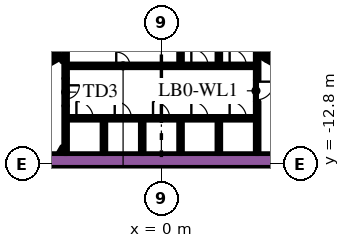
"""IFC4 building model, lengths in metres.
Left out: names, types, materials, properties, quantities, classifications, styles, units other than length and angle.
Written with IfcOpenShell. Run it as: python <this file> out.ifc"""

import sys

from ifc_helpers import new_model, si_unit, direction, frame, frame_2d, origin, place, context, subcontext, project, spatial, rectangle, extrude, element, fill, save


model = new_model("IFC4")
c1 = context("Model", 3, precision=1e-05, world=origin(), true_north=direction((0.0, 1.0)))
c2 = subcontext(c1, "Body", "Model", "MODEL_VIEW")
j1 = project(units=[si_unit("LENGTHUNIT", "METRE"), si_unit("PLANEANGLEUNIT", "RADIAN")], contexts=[c1])
p1 = place(None, origin())
s1 = spatial("IfcSite", under=j1, at=p1, CompositionType="ELEMENT")
p2 = place(p1, origin())
s2 = spatial("IfcBuilding", under=s1, at=p2, CompositionType="ELEMENT")
p3 = place(p2, frame((0.0, 0.0, 21.6)))
s3 = spatial("IfcBuildingStorey", under=s2, at=p3, CompositionType="ELEMENT", Elevation=21.6)
p4 = place(p3, frame((-12.019, -12.55, 0.0), z_axis=(0.0, 0.0, 1.0), x_axis=(1.0, 0.0, 0.0)))
e1 = element("IfcWall", 1, at=p4, inside=s3, PredefinedType="SOLIDWALL", context=c2, shape_type="SweptSolid", body=[
    extrude(rectangle(XDim=21.63, YDim=0.9, at=frame_2d((10.815, 0.0))), origin(), (0.0, 0.0, 1.0), 6.0),
])
p5 = place(p3, frame((12.84, -9.261, 0.0), z_axis=(0.0, 0.0, 1.0), x_axis=(-0.866013990052, 0.500019768644, 0.0)))
e2 = element("IfcWall", 2, at=p5, inside=s3, PredefinedType="SOLIDWALL", context=c2, shape_type="SweptSolid", body=[
    extrude(rectangle(XDim=6.8, YDim=0.25, at=frame_2d((3.4, 0.0))), origin(), (0.0, 0.0, 1.0), 6.0),
])
p6 = place(p3, frame((6.78, -5.906, 0.0), z_axis=(0.0, 0.0, 1.0), x_axis=(0.500223362819, 0.865896406789, 0.0)))
e3 = element("IfcWall", 3, at=p6, inside=s3, PredefinedType="SOLIDWALL", context=c2, shape_type="SweptSolid", body=[
    extrude(rectangle(XDim=0.675, YDim=0.25, at=frame_2d((0.337, 0.0))), origin(), (0.0, 0.0, 1.0), 6.0),
])
p7 = place(p3, frame((-12.84, -9.261, 0.0), z_axis=(0.0, 0.0, 1.0), x_axis=(0.866016039709, 0.500016218704, 0.0)))
e4 = element("IfcWall", 4, at=p7, inside=s3, PredefinedType="SOLIDWALL", context=c2, shape_type="SweptSolid", body=[
    extrude(rectangle(XDim=7.05, YDim=0.25, at=frame_2d((3.525, 0.0))), origin(), (0.0, 0.0, 1.0), 6.0),
])
p8 = place(p3, frame((-6.905, -5.69, 0.0), z_axis=(0.0, 0.0, 1.0), x_axis=(-0.500402024738, 0.865793170242, 0.0)))
e5 = element("IfcWall", 5, at=p8, inside=s3, PredefinedType="SOLIDWALL", context=c2, shape_type="SweptSolid", body=[
    extrude(rectangle(XDim=0.425, YDim=0.25, at=frame_2d((0.212, 0.0))), origin(), (0.0, 0.0, 1.0), 6.0),
])
p9 = place(p3, frame((-3.78, -12.1, 0.0), z_axis=(0.0, 0.0, 1.0), x_axis=(0.0, 1.0, 0.0)))
e6 = element("IfcWall", 6, at=p9, inside=s3, PredefinedType="SOLIDWALL", context=c2, shape_type="SweptSolid", body=[
    extrude(rectangle(XDim=2.2, YDim=0.25, at=frame_2d((1.1, 0.0))), origin(), (0.0, 0.0, 1.0), 6.0),
])
p10 = place(p3, frame((-6.3, -12.1, 0.0), z_axis=(0.0, 0.0, 1.0), x_axis=(0.0, 1.0, 0.0)))
e7 = element("IfcWall", 7, at=p10, inside=s3, PredefinedType="SOLIDWALL", context=c2, shape_type="SweptSolid", body=[
    extrude(rectangle(XDim=3.146, YDim=0.25, at=frame_2d((1.573, 0.0))), origin(), (0.0, 0.0, 1.0), 6.0),
])
p11 = place(p3, frame((6.3, -8.67, 0.0), z_axis=(0.0, 0.0, 1.0), x_axis=(0.0, -1.0, 0.0)))
e8 = element("IfcWall", 8, at=p11, inside=s3, PredefinedType="SOLIDWALL", context=c2, shape_type="SweptSolid", body=[
    extrude(rectangle(XDim=3.43, YDim=0.25, at=frame_2d((1.715, 0.0))), origin(), (0.0, 0.0, 1.0), 6.0),
])
p12 = place(p3, frame((6.3, -7.268, 0.0), z_axis=(0.0, 0.0, 1.0), x_axis=(0.0, 1.0, 0.0)))
e9 = element("IfcWall", 9, at=p12, inside=s3, PredefinedType="SOLIDWALL", context=c2, shape_type="SweptSolid", body=[
    extrude(rectangle(XDim=3.268, YDim=0.25, at=frame_2d((1.634, 0.0))), origin(), (0.0, 0.0, 1.0), 6.0),
])
for number, where, z_axis, x_axis in (
    (10, (3.78, -4.0, 0.0), (0.0, 0.0, 1.0), (0.0, -1.0, 0.0)),
    (11, (1.26, -4.0, 0.0), (0.0, 0.0, 1.0), (0.0, -1.0, 0.0)),
):
    element("IfcWall", number, at=place(p3, frame(where, z_axis=z_axis, x_axis=x_axis)), inside=s3, PredefinedType="SOLIDWALL", context=c2, shape_type="SweptSolid", body=[
        extrude(rectangle(XDim=2.2, YDim=0.25, at=frame_2d((1.1, 0.0))), origin(), (0.0, 0.0, 1.0), 6.0),
    ])
p13 = place(p3, frame((-6.3, -4.0, 0.0), z_axis=(0.0, 0.0, 1.0), x_axis=(0.0, -1.0, 0.0)))
e12 = element("IfcWall", 12, at=p13, inside=s3, PredefinedType="SOLIDWALL", context=c2, shape_type="SweptSolid", body=[
    extrude(rectangle(XDim=3.154, YDim=0.25, at=frame_2d((1.577, 0.0))), origin(), (0.0, 0.0, 1.0), 6.0),
])
for number, where, z_axis, x_axis in (
    (13, (3.78, -12.1, 0.0), (0.0, 0.0, 1.0), (0.0, 1.0, 0.0)),
    (14, (1.26, -12.1, 0.0), (0.0, 0.0, 1.0), (0.0, 1.0, 0.0)),
    (15, (-1.26, -12.1, 0.0), (0.0, 0.0, 1.0), (0.0, 1.0, 0.0)),
):
    element("IfcWall", number, at=place(p3, frame(where, z_axis=z_axis, x_axis=x_axis)), inside=s3, PredefinedType="SOLIDWALL", context=c2, shape_type="SweptSolid", body=[
        extrude(rectangle(XDim=2.2, YDim=0.25, at=frame_2d((1.1, 0.0))), origin(), (0.0, 0.0, 1.0), 6.0),
    ])
p14 = place(p3, frame((-6.708, -12.068, 0.0), z_axis=(0.0, 0.0, 1.0), x_axis=(0.500000789788, 0.8660249478, 0.0)))
e16 = element("IfcWall", 16, at=p14, inside=s3, PredefinedType="PARTITIONING", context=c2, shape_type="SweptSolid", body=[
    extrude(rectangle(XDim=0.456, YDim=0.15, at=frame_2d((0.228, 0.0))), origin(), (0.0, 0.0, 1.0), 4.85),
])
p15 = place(p3, frame((-6.534, -12.068, 0.0), z_axis=(0.0, 0.0, 1.0), x_axis=(0.500240224089, 0.865886665912, 0.0)))
e17 = element("IfcWall", 17, at=p15, inside=s3, PredefinedType="PARTITIONING", context=c2, shape_type="SweptSolid", body=[
    extrude(rectangle(XDim=0.109, YDim=0.15, at=frame_2d((0.054, 0.0))), origin(), (0.0, 0.0, 1.0), 4.85),
])
p16 = place(p3, frame((-6.48, -6.027, 0.0), z_axis=(0.0, 0.0, 1.0), x_axis=(-0.499927229454, 0.866067413802, 0.0)))
e18 = element("IfcWall", 18, at=p16, inside=s3, PredefinedType="PARTITIONING", context=c2, shape_type="SweptSolid", body=[
    extrude(rectangle(XDim=0.929, YDim=0.15, at=frame_2d((0.464, 0.0))), origin(), (0.0, 0.0, 1.0), 6.0),
])
p17 = place(p3, frame((6.945, -5.222, 0.0), z_axis=(0.0, 0.0, 1.0), x_axis=(-0.499818422106, -0.866130212453, 0.0)))
e19 = element("IfcWall", 19, at=p17, inside=s3, PredefinedType="PARTITIONING", context=c2, shape_type="SweptSolid", body=[
    extrude(rectangle(XDim=0.514, YDim=0.15, at=frame_2d((0.257, 0.0))), origin(), (0.0, 0.0, 1.0), 4.85),
])
p18 = place(p3, frame((-6.175, -9.775, 0.0), z_axis=(0.0, 0.0, 1.0), x_axis=(1.0, 0.0, 0.0)))
e20 = element("IfcWall", 20, at=p18, inside=s3, PredefinedType="SOLIDWALL", context=c2, shape_type="SweptSolid", body=[
    extrude(rectangle(XDim=12.35, YDim=0.25, at=frame_2d((6.175, 0.0))), origin(), (0.0, 0.0, 1.0), 6.0),
])
p19 = place(p18, frame((0.585, 0.0, 0.0)))
e21 = element("IfcOpeningElement", 21, at=p19, cuts=e20, PredefinedType="OPENING", context=c2, shape_type="SweptSolid", body=[
    extrude(rectangle(XDim=1.1, YDim=2.1, at=frame_2d((0.55, 1.05))), frame((0.0, 0.135, 0.0), z_axis=(0.0, -1.0, 0.0), x_axis=(1.0, 0.0, 0.0)), (0.0, 0.0, 1.0), 0.27),
])
p20 = place(p18, frame((3.105, 0.0, 0.0)))
e22 = element("IfcOpeningElement", 22, at=p20, cuts=e20, PredefinedType="OPENING", context=c2, shape_type="SweptSolid", body=[
    extrude(rectangle(XDim=1.1, YDim=2.1, at=frame_2d((0.55, 1.05))), frame((0.0, 0.135, 0.0), z_axis=(0.0, -1.0, 0.0), x_axis=(1.0, 0.0, 0.0)), (0.0, 0.0, 1.0), 0.27),
])
p21 = place(p18, frame((5.625, 0.0, 0.0)))
e23 = element("IfcOpeningElement", 23, at=p21, cuts=e20, PredefinedType="OPENING", context=c2, shape_type="SweptSolid", body=[
    extrude(rectangle(XDim=1.1, YDim=2.1, at=frame_2d((0.55, 1.05))), frame((0.0, 0.135, 0.0), z_axis=(0.0, -1.0, 0.0), x_axis=(1.0, 0.0, 0.0)), (0.0, 0.0, 1.0), 0.27),
])
p22 = place(p18, frame((8.145, 0.0, 0.0)))
e24 = element("IfcOpeningElement", 24, at=p22, cuts=e20, PredefinedType="OPENING", context=c2, shape_type="SweptSolid", body=[
    extrude(rectangle(XDim=1.1, YDim=2.1, at=frame_2d((0.55, 1.05))), frame((0.0, 0.135, 0.0), z_axis=(0.0, -1.0, 0.0), x_axis=(1.0, 0.0, 0.0)), (0.0, 0.0, 1.0), 0.27),
])
p23 = place(p18, frame((10.665, 0.0, 0.0)))
e25 = element("IfcOpeningElement", 25, at=p23, cuts=e20, PredefinedType="OPENING", context=c2, shape_type="SweptSolid", body=[
    extrude(rectangle(XDim=1.1, YDim=2.1, at=frame_2d((0.55, 1.05))), frame((0.0, 0.135, 0.0), z_axis=(0.0, -1.0, 0.0), x_axis=(1.0, 0.0, 0.0)), (0.0, 0.0, 1.0), 0.27),
])
p24 = place(p3, frame((-6.175, -6.325, 0.0), z_axis=(0.0, 0.0, 1.0), x_axis=(1.0, 0.0, 0.0)))
e26 = element("IfcWall", 26, at=p24, inside=s3, PredefinedType="SOLIDWALL", context=c2, shape_type="SweptSolid", body=[
    extrude(rectangle(XDim=12.35, YDim=0.25, at=frame_2d((6.175, 0.0))), origin(), (0.0, 0.0, 1.0), 6.0),
])
p25 = place(p24, frame((3.205, 0.0, 0.0)))
e27 = element("IfcOpeningElement", 27, at=p25, cuts=e26, PredefinedType="OPENING", context=c2, shape_type="SweptSolid", body=[
    extrude(rectangle(XDim=0.9, YDim=2.1, at=frame_2d((0.45, 1.05))), frame((0.0, 0.135, 0.0), z_axis=(0.0, -1.0, 0.0), x_axis=(1.0, 0.0, 0.0)), (0.0, 0.0, 1.0), 0.27),
])
p26 = place(p24, frame((8.145, 0.0, 0.0)))
e28 = element("IfcOpeningElement", 28, at=p26, cuts=e26, PredefinedType="OPENING", context=c2, shape_type="SweptSolid", body=[
    extrude(rectangle(XDim=1.1, YDim=2.1, at=frame_2d((0.55, 1.05))), frame((0.0, 0.135, 0.0), z_axis=(0.0, -1.0, 0.0), x_axis=(1.0, 0.0, 0.0)), (0.0, 0.0, 1.0), 0.27),
])
p27 = place(p24, frame((10.665, 0.0, 0.0)))
e29 = element("IfcOpeningElement", 29, at=p27, cuts=e26, PredefinedType="OPENING", context=c2, shape_type="SweptSolid", body=[
    extrude(rectangle(XDim=1.1, YDim=2.1, at=frame_2d((0.55, 1.05))), frame((0.0, 0.135, 0.0), z_axis=(0.0, -1.0, 0.0), x_axis=(1.0, 0.0, 0.0)), (0.0, 0.0, 1.0), 0.27),
])
p28 = place(p3, frame((-6.3, -7.154, 0.0), z_axis=(0.0, 0.0, 1.0), x_axis=(0.0, -1.0, 0.0)))
e30 = element("IfcWall", 30, at=p28, inside=s3, PredefinedType="SOLIDWALL", context=c2, shape_type="SweptSolid", body=[
    extrude(rectangle(XDim=1.8, YDim=0.25, at=frame_2d((0.9, 0.0))), origin(), (0.0, 0.0, 1.0), 6.0),
])
p29 = place(p28, frame((0.45, 0.0, 0.0)))
e31 = element("IfcOpeningElement", 31, at=p29, cuts=e30, PredefinedType="OPENING", context=c2, shape_type="SweptSolid", body=[
    extrude(rectangle(XDim=0.9, YDim=2.1, at=frame_2d((0.45, 1.05))), frame((0.0, 0.135, 0.0), z_axis=(0.0, -1.0, 0.0), x_axis=(1.0, 0.0, 0.0)), (0.0, 0.0, 1.0), 0.27),
])
p30 = place(p3, frame((6.22, -7.266, 0.0), z_axis=(0.0, 0.0, 1.0), x_axis=(0.0, -1.0, 0.0)))
e32 = element("IfcWall", 32, at=p30, inside=s3, PredefinedType="PARTITIONING", context=c2, shape_type="SweptSolid", body=[
    extrude(rectangle(XDim=1.4, YDim=0.09, at=frame_2d((0.7, 0.0))), origin(), (0.0, 0.0, 1.0), 4.85),
])
p31 = place(p30, frame((0.1, 0.0, 0.0)))
e33 = element("IfcOpeningElement", 33, at=p31, cuts=e32, PredefinedType="OPENING", context=c2, shape_type="SweptSolid", body=[
    extrude(rectangle(XDim=1.2, YDim=2.1, at=frame_2d((0.6, 1.05))), frame((0.0, 0.055, 0.0), z_axis=(0.0, -1.0, 0.0), x_axis=(1.0, 0.0, 0.0)), (0.0, 0.0, 1.0), 0.11),
])
for number, where, z_axis, x_axis in (
    (34, (38.25, -14.145, 0.0), (0.0, 0.0, 1.0), (-0.5, 0.866, 0.0)),
    (35, (-6.875, 40.198, 0.0), (0.0, 0.0, 1.0), (-0.5, -0.866, 0.0)),
):
    element("IfcWall", number, at=place(p3, frame(where, z_axis=z_axis, x_axis=x_axis)), inside=s3, PredefinedType="SOLIDWALL", context=c2, shape_type="SweptSolid", body=[
        extrude(rectangle(XDim=62.75, YDim=0.25, at=frame_2d((31.375, 0.0))), origin(), (0.0, 0.0, 1.0), 4.5),
    ])
p32 = place(p19, origin())
e36 = element("IfcDoor", 36, at=p32, inside=s3, OperationType="DOUBLE_DOOR_SLIDING", PredefinedType="DOOR", context=c2, shape_type="SweptSolid", body=[
    extrude(rectangle(XDim=1.1, YDim=2.1, at=frame_2d((0.55, 1.05))), frame((0.0, 0.025, 0.0), z_axis=(0.0, -1.0, 0.0), x_axis=(1.0, 0.0, 0.0)), (0.0, 0.0, 1.0), 0.05),
])
fill(e21, e36)
p33 = place(p20, origin())
e37 = element("IfcDoor", 37, at=p33, inside=s3, OperationType="DOUBLE_DOOR_SLIDING", PredefinedType="DOOR", context=c2, shape_type="SweptSolid", body=[
    extrude(rectangle(XDim=1.1, YDim=2.1, at=frame_2d((0.55, 1.05))), frame((0.0, 0.025, 0.0), z_axis=(0.0, -1.0, 0.0), x_axis=(1.0, 0.0, 0.0)), (0.0, 0.0, 1.0), 0.05),
])
fill(e22, e37)
p34 = place(p21, origin())
e38 = element("IfcDoor", 38, at=p34, inside=s3, OperationType="DOUBLE_DOOR_SLIDING", PredefinedType="DOOR", context=c2, shape_type="SweptSolid", body=[
    extrude(rectangle(XDim=1.1, YDim=2.1, at=frame_2d((0.55, 1.05))), frame((0.0, 0.025, 0.0), z_axis=(0.0, -1.0, 0.0), x_axis=(1.0, 0.0, 0.0)), (0.0, 0.0, 1.0), 0.05),
])
fill(e23, e38)
p35 = place(p22, origin())
e39 = element("IfcDoor", 39, at=p35, inside=s3, OperationType="DOUBLE_DOOR_SLIDING", PredefinedType="DOOR", context=c2, shape_type="SweptSolid", body=[
    extrude(rectangle(XDim=1.1, YDim=2.1, at=frame_2d((0.55, 1.05))), frame((0.0, 0.025, 0.0), z_axis=(0.0, -1.0, 0.0), x_axis=(1.0, 0.0, 0.0)), (0.0, 0.0, 1.0), 0.05),
])
fill(e24, e39)
p36 = place(p23, origin())
e40 = element("IfcDoor", 40, at=p36, inside=s3, OperationType="DOUBLE_DOOR_SLIDING", PredefinedType="DOOR", context=c2, shape_type="SweptSolid", body=[
    extrude(rectangle(XDim=1.1, YDim=2.1, at=frame_2d((0.55, 1.05))), frame((0.0, 0.025, 0.0), z_axis=(0.0, -1.0, 0.0), x_axis=(1.0, 0.0, 0.0)), (0.0, 0.0, 1.0), 0.05),
])
fill(e25, e40)
p37 = place(p25, origin())
e41 = element("IfcDoor", 41, at=p37, inside=s3, OperationType="SINGLE_SWING_LEFT", PredefinedType="DOOR", context=c2, shape_type="SweptSolid", body=[
    extrude(rectangle(XDim=0.9, YDim=2.1, at=frame_2d((0.45, 1.05))), frame((0.0, 0.025, 0.0), z_axis=(0.0, -1.0, 0.0), x_axis=(1.0, 0.0, 0.0)), (0.0, 0.0, 1.0), 0.05),
])
fill(e27, e41)
p38 = place(p26, origin())
e42 = element("IfcDoor", 42, at=p38, inside=s3, OperationType="DOUBLE_DOOR_SLIDING", PredefinedType="DOOR", context=c2, shape_type="SweptSolid", body=[
    extrude(rectangle(XDim=1.1, YDim=2.1, at=frame_2d((0.55, 1.05))), frame((0.0, 0.025, 0.0), z_axis=(0.0, -1.0, 0.0), x_axis=(1.0, 0.0, 0.0)), (0.0, 0.0, 1.0), 0.05),
])
fill(e28, e42)
p39 = place(p27, origin())
e43 = element("IfcDoor", 43, at=p39, inside=s3, OperationType="DOUBLE_DOOR_SLIDING", PredefinedType="DOOR", context=c2, shape_type="SweptSolid", body=[
    extrude(rectangle(XDim=1.1, YDim=2.1, at=frame_2d((0.55, 1.05))), frame((0.0, 0.025, 0.0), z_axis=(0.0, -1.0, 0.0), x_axis=(1.0, 0.0, 0.0)), (0.0, 0.0, 1.0), 0.05),
])
fill(e29, e43)
p40 = place(p29, origin())
e44 = element("IfcDoor", 44, at=p40, inside=s3, OperationType="SINGLE_SWING_LEFT", PredefinedType="DOOR", context=c2, shape_type="SweptSolid", body=[
    extrude(rectangle(XDim=0.9, YDim=2.1, at=frame_2d((0.45, 1.05))), frame((0.0, 0.025, 0.0), z_axis=(0.0, -1.0, 0.0), x_axis=(1.0, 0.0, 0.0)), (0.0, 0.0, 1.0), 0.05),
])
fill(e31, e44)
p41 = place(p31, origin())
e45 = element("IfcDoor", 45, at=p41, inside=s3, OperationType="SINGLE_SWING_LEFT", PredefinedType="DOOR", context=c2, shape_type="SweptSolid", body=[
    extrude(rectangle(XDim=1.2, YDim=2.1, at=frame_2d((0.6, 1.05))), frame((0.0, 0.025, 0.0), z_axis=(0.0, -1.0, 0.0), x_axis=(1.0, 0.0, 0.0)), (0.0, 0.0, 1.0), 0.05),
])
fill(e33, e45)
save(model, sys.argv[1])
